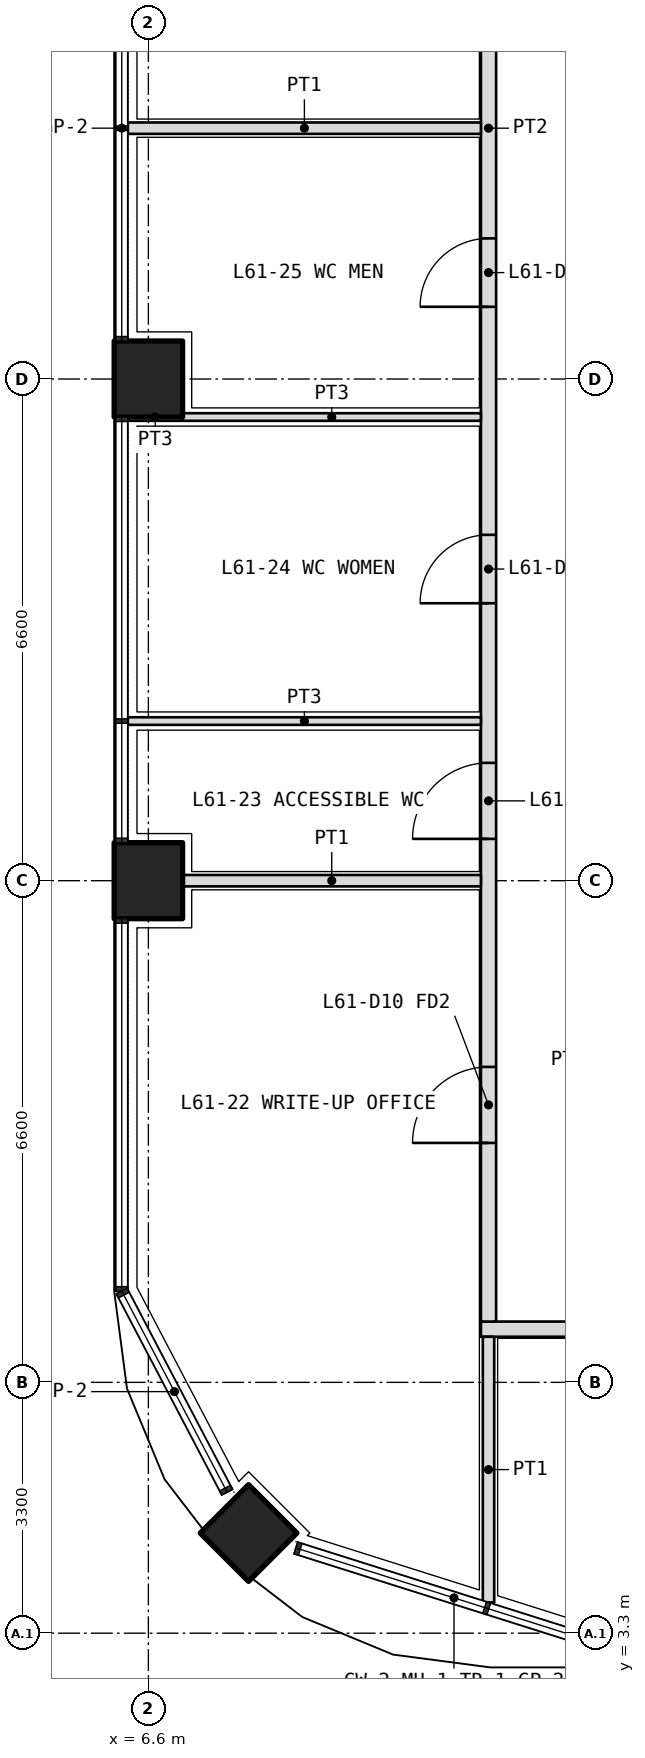
"""IFC4 building model, lengths in metres.
Left out: names, types, materials, properties, quantities, classifications, styles, units other than length and angle.
Written with IfcOpenShell. Run it as: python <this file> out.ifc"""

import sys

from ifc_helpers import new_model, si_unit, direction, frame, frame_2d, origin, origin_2d, place, context, subcontext, project, spatial, rectangle, extrude, element, fill, save


model = new_model("IFC4")
c1 = context("Model", 3, precision=1e-05, world=origin(), true_north=direction((0.0, 1.0)))
c2 = subcontext(c1, "Body", "Model", "MODEL_VIEW")
j1 = project(units=[si_unit("LENGTHUNIT", "METRE"), si_unit("PLANEANGLEUNIT", "RADIAN")], contexts=[c1])
p1 = place(None, origin())
s1 = spatial("IfcSite", under=j1, at=p1, CompositionType="ELEMENT")
p2 = place(p1, origin())
s2 = spatial("IfcBuilding", under=s1, at=p2, CompositionType="ELEMENT")
p3 = place(p2, frame((0.0, 0.0, 267.0)))
s3 = spatial("IfcBuildingStorey", under=s2, at=p3, CompositionType="ELEMENT", Elevation=267.0)
p4 = place(p3, frame((7.918, 4.618, 0.0), z_axis=(0.0, 0.0, 1.0), x_axis=(0.707106781187, 0.707106781187, 0.0)))
e1 = element("IfcColumn", 1, at=p4, inside=s3, PredefinedType="COLUMN", context=c2, shape_type="SweptSolid", body=[
    extrude(rectangle(XDim=0.9, YDim=0.9, at=origin_2d()), origin(), (0.0, 0.0, 1.0), 4.2),
])
for number, where, z_axis, x_axis in (
    (2, (6.6, 13.2, 0.0), (0.0, 0.0, 1.0), (0.0, 1.0, 0.0)),
    (3, (6.6, 19.8, 0.0), (0.0, 0.0, 1.0), (0.0, 1.0, 0.0)),
):
    element("IfcColumn", number, at=place(p3, frame(where, z_axis=z_axis, x_axis=x_axis)), inside=s3, PredefinedType="COLUMN", context=c2, shape_type="SweptSolid", body=[
        extrude(rectangle(XDim=1.0, YDim=0.9, at=origin_2d()), origin(), (0.0, 0.0, 1.0), 4.2),
    ])
p5 = place(p3, frame((10.975, 7.3, 0.0), z_axis=(0.0, 0.0, 1.0), x_axis=(1.0, 0.0, 0.0)))
e4 = element("IfcWall", 4, at=p5, inside=s3, PredefinedType="PARTITIONING", context=c2, shape_type="SweptSolid", body=[
    extrude(rectangle(XDim=30.85, YDim=0.2, at=frame_2d((15.425, 0.0))), origin(), (0.0, 0.0, 1.0), 3.0),
])
p6 = place(p5, frame((7.262, 0.0, 0.0)))
e5 = element("IfcOpeningElement", 5, at=p6, cuts=e4, PredefinedType="OPENING", context=c2, shape_type="SweptSolid", body=[
    extrude(rectangle(XDim=1.0, YDim=2.1, at=frame_2d((0.5, 1.05))), frame((0.0, 0.11, 0.0), z_axis=(0.0, -1.0, 0.0), x_axis=(1.0, 0.0, 0.0)), (0.0, 0.0, 1.0), 0.22),
])
p7 = place(p5, frame((16.625, 0.0, 0.0)))
e6 = element("IfcOpeningElement", 6, at=p7, cuts=e4, PredefinedType="OPENING", context=c2, shape_type="SweptSolid", body=[
    extrude(rectangle(XDim=1.0, YDim=2.1, at=frame_2d((0.5, 1.05))), frame((0.0, 0.11, 0.0), z_axis=(0.0, -1.0, 0.0), x_axis=(1.0, 0.0, 0.0)), (0.0, 0.0, 1.0), 0.22),
])
p8 = place(p5, frame((19.925, 0.0, 0.0)))
e7 = element("IfcOpeningElement", 7, at=p8, cuts=e4, PredefinedType="OPENING", context=c2, shape_type="SweptSolid", body=[
    extrude(rectangle(XDim=1.0, YDim=2.1, at=frame_2d((0.5, 1.05))), frame((0.0, 0.11, 0.0), z_axis=(0.0, -1.0, 0.0), x_axis=(1.0, 0.0, 0.0)), (0.0, 0.0, 1.0), 0.22),
])
p9 = place(p5, frame((25.887, 0.0, 0.0)))
e8 = element("IfcOpeningElement", 8, at=p9, cuts=e4, PredefinedType="OPENING", context=c2, shape_type="SweptSolid", body=[
    extrude(rectangle(XDim=1.0, YDim=2.1, at=frame_2d((0.5, 1.05))), frame((0.0, 0.11, 0.0), z_axis=(0.0, -1.0, 0.0), x_axis=(1.0, 0.0, 0.0)), (0.0, 0.0, 1.0), 0.22),
])
p10 = place(p3, frame((11.075, 7.4, 0.0), z_axis=(0.0, 0.0, 1.0), x_axis=(0.0, 1.0, 0.0)))
e9 = element("IfcWall", 9, at=p10, inside=s3, PredefinedType="PARTITIONING", context=c2, shape_type="SweptSolid", body=[
    extrude(rectangle(XDim=31.4, YDim=0.2, at=frame_2d((15.7, 0.0))), origin(), (0.0, 0.0, 1.0), 3.0),
])
p11 = place(p10, frame((2.35, 0.0, 0.0)))
e10 = element("IfcOpeningElement", 10, at=p11, cuts=e9, PredefinedType="OPENING", context=c2, shape_type="SweptSolid", body=[
    extrude(rectangle(XDim=1.0, YDim=2.1, at=frame_2d((0.5, 1.05))), frame((0.0, 0.11, 0.0), z_axis=(0.0, -1.0, 0.0), x_axis=(1.0, 0.0, 0.0)), (0.0, 0.0, 1.0), 0.22),
])
p12 = place(p10, frame((6.35, 0.0, 0.0)))
e11 = element("IfcOpeningElement", 11, at=p12, cuts=e9, PredefinedType="OPENING", context=c2, shape_type="SweptSolid", body=[
    extrude(rectangle(XDim=1.0, YDim=2.1, at=frame_2d((0.5, 1.05))), frame((0.0, 0.11, 0.0), z_axis=(0.0, -1.0, 0.0), x_axis=(1.0, 0.0, 0.0)), (0.0, 0.0, 1.0), 0.22),
])
p13 = place(p10, frame((9.45, 0.0, 0.0)))
e12 = element("IfcOpeningElement", 12, at=p13, cuts=e9, PredefinedType="OPENING", context=c2, shape_type="SweptSolid", body=[
    extrude(rectangle(XDim=0.9, YDim=2.1, at=frame_2d((0.45, 1.05))), frame((0.0, 0.11, 0.0), z_axis=(0.0, -1.0, 0.0), x_axis=(1.0, 0.0, 0.0)), (0.0, 0.0, 1.0), 0.22),
])
p14 = place(p10, frame((13.35, 0.0, 0.0)))
e13 = element("IfcOpeningElement", 13, at=p14, cuts=e9, PredefinedType="OPENING", context=c2, shape_type="SweptSolid", body=[
    extrude(rectangle(XDim=0.9, YDim=2.1, at=frame_2d((0.45, 1.05))), frame((0.0, 0.11, 0.0), z_axis=(0.0, -1.0, 0.0), x_axis=(1.0, 0.0, 0.0)), (0.0, 0.0, 1.0), 0.22),
])
p15 = place(p10, frame((18.5, 0.0, 0.0)))
e14 = element("IfcOpeningElement", 14, at=p15, cuts=e9, PredefinedType="OPENING", context=c2, shape_type="SweptSolid", body=[
    extrude(rectangle(XDim=1.0, YDim=2.1, at=frame_2d((0.5, 1.05))), frame((0.0, 0.11, 0.0), z_axis=(0.0, -1.0, 0.0), x_axis=(1.0, 0.0, 0.0)), (0.0, 0.0, 1.0), 0.22),
])
p16 = place(p10, frame((23.45, 0.0, 0.0)))
e15 = element("IfcOpeningElement", 15, at=p16, cuts=e9, PredefinedType="OPENING", context=c2, shape_type="SweptSolid", body=[
    extrude(rectangle(XDim=1.0, YDim=2.1, at=frame_2d((0.5, 1.05))), frame((0.0, 0.11, 0.0), z_axis=(0.0, -1.0, 0.0), x_axis=(1.0, 0.0, 0.0)), (0.0, 0.0, 1.0), 0.22),
])
p17 = place(p10, frame((28.05, 0.0, 0.0)))
e16 = element("IfcOpeningElement", 16, at=p17, cuts=e9, PredefinedType="OPENING", context=c2, shape_type="SweptSolid", body=[
    extrude(rectangle(XDim=1.0, YDim=2.1, at=frame_2d((0.5, 1.05))), frame((0.0, 0.11, 0.0), z_axis=(0.0, -1.0, 0.0), x_axis=(1.0, 0.0, 0.0)), (0.0, 0.0, 1.0), 0.22),
])
p18 = place(p3, frame((11.075, 3.705, 0.0), z_axis=(0.0, 0.0, 1.0), x_axis=(0.0, 1.0, 0.0)))
e17 = element("IfcWall", 17, at=p18, inside=s3, PredefinedType="PARTITIONING", context=c2, shape_type="SweptSolid", body=[
    extrude(rectangle(XDim=3.495, YDim=0.15, at=frame_2d((1.748, 0.0))), origin(), (0.0, 0.0, 1.0), 2.7),
])
p19 = place(p3, frame((6.33, 15.3, 0.0), z_axis=(0.0, 0.0, 1.0), x_axis=(1.0, 0.0, 0.0)))
e18 = element("IfcWall", 18, at=p19, inside=s3, PredefinedType="PARTITIONING", context=c2, shape_type="SweptSolid", body=[
    extrude(rectangle(XDim=4.645, YDim=0.1, at=frame_2d((2.323, 0.0))), origin(), (0.0, 0.0, 1.0), 2.7),
])
p20 = place(p3, frame((6.33, 19.3, 0.0), z_axis=(0.0, 0.0, 1.0), x_axis=(1.0, 0.0, 0.0)))
e19 = element("IfcWall", 19, at=p20, inside=s3, PredefinedType="PARTITIONING", context=c2, shape_type="SweptSolid", body=[
    extrude(rectangle(XDim=0.72, YDim=0.1, at=frame_2d((0.36, 0.0))), origin(), (0.0, 0.0, 1.0), 2.7),
])
p21 = place(p3, frame((7.05, 19.3, 0.0), z_axis=(0.0, 0.0, 1.0), x_axis=(1.0, 0.0, 0.0)))
e20 = element("IfcWall", 20, at=p21, inside=s3, PredefinedType="PARTITIONING", context=c2, shape_type="SweptSolid", body=[
    extrude(rectangle(XDim=3.925, YDim=0.1, at=frame_2d((1.962, 0.0))), origin(), (0.0, 0.0, 1.0), 3.0),
])
p22 = place(p3, frame((6.33, 23.1, 0.0), z_axis=(0.0, 0.0, 1.0), x_axis=(1.0, 0.0, 0.0)))
e21 = element("IfcWall", 21, at=p22, inside=s3, PredefinedType="PARTITIONING", context=c2, shape_type="SweptSolid", body=[
    extrude(rectangle(XDim=4.645, YDim=0.15, at=frame_2d((2.323, 0.0))), origin(), (0.0, 0.0, 1.0), 2.7),
])
p23 = place(p3, frame((7.05, 13.2, 0.0), z_axis=(0.0, 0.0, 1.0), x_axis=(1.0, 0.0, 0.0)))
e22 = element("IfcWall", 22, at=p23, inside=s3, PredefinedType="PARTITIONING", context=c2, shape_type="SweptSolid", body=[
    extrude(rectangle(XDim=3.925, YDim=0.15, at=frame_2d((1.962, 0.0))), origin(), (0.0, 0.0, 1.0), 3.0),
])
p24 = place(p11, origin())
e23 = element("IfcDoor", 23, at=p24, inside=s3, OperationType="SINGLE_SWING_LEFT", PredefinedType="DOOR", context=c2, shape_type="SweptSolid", body=[
    extrude(rectangle(XDim=1.0, YDim=2.1, at=frame_2d((0.5, 1.05))), frame((0.0, 0.025, 0.0), z_axis=(0.0, -1.0, 0.0), x_axis=(1.0, 0.0, 0.0)), (0.0, 0.0, 1.0), 0.05),
])
fill(e10, e23)
p25 = place(p12, origin())
e24 = element("IfcDoor", 24, at=p25, inside=s3, OperationType="SINGLE_SWING_LEFT", PredefinedType="DOOR", context=c2, shape_type="SweptSolid", body=[
    extrude(rectangle(XDim=1.0, YDim=2.1, at=frame_2d((0.5, 1.05))), frame((0.0, 0.025, 0.0), z_axis=(0.0, -1.0, 0.0), x_axis=(1.0, 0.0, 0.0)), (0.0, 0.0, 1.0), 0.05),
])
fill(e11, e24)
p26 = place(p13, origin())
e25 = element("IfcDoor", 25, at=p26, inside=s3, OperationType="SINGLE_SWING_LEFT", PredefinedType="DOOR", context=c2, shape_type="SweptSolid", body=[
    extrude(rectangle(XDim=0.9, YDim=2.1, at=frame_2d((0.45, 1.05))), frame((0.0, 0.025, 0.0), z_axis=(0.0, -1.0, 0.0), x_axis=(1.0, 0.0, 0.0)), (0.0, 0.0, 1.0), 0.05),
])
fill(e12, e25)
p27 = place(p14, origin())
e26 = element("IfcDoor", 26, at=p27, inside=s3, OperationType="SINGLE_SWING_LEFT", PredefinedType="DOOR", context=c2, shape_type="SweptSolid", body=[
    extrude(rectangle(XDim=0.9, YDim=2.1, at=frame_2d((0.45, 1.05))), frame((0.0, 0.025, 0.0), z_axis=(0.0, -1.0, 0.0), x_axis=(1.0, 0.0, 0.0)), (0.0, 0.0, 1.0), 0.05),
])
fill(e13, e26)
save(model, sys.argv[1])
